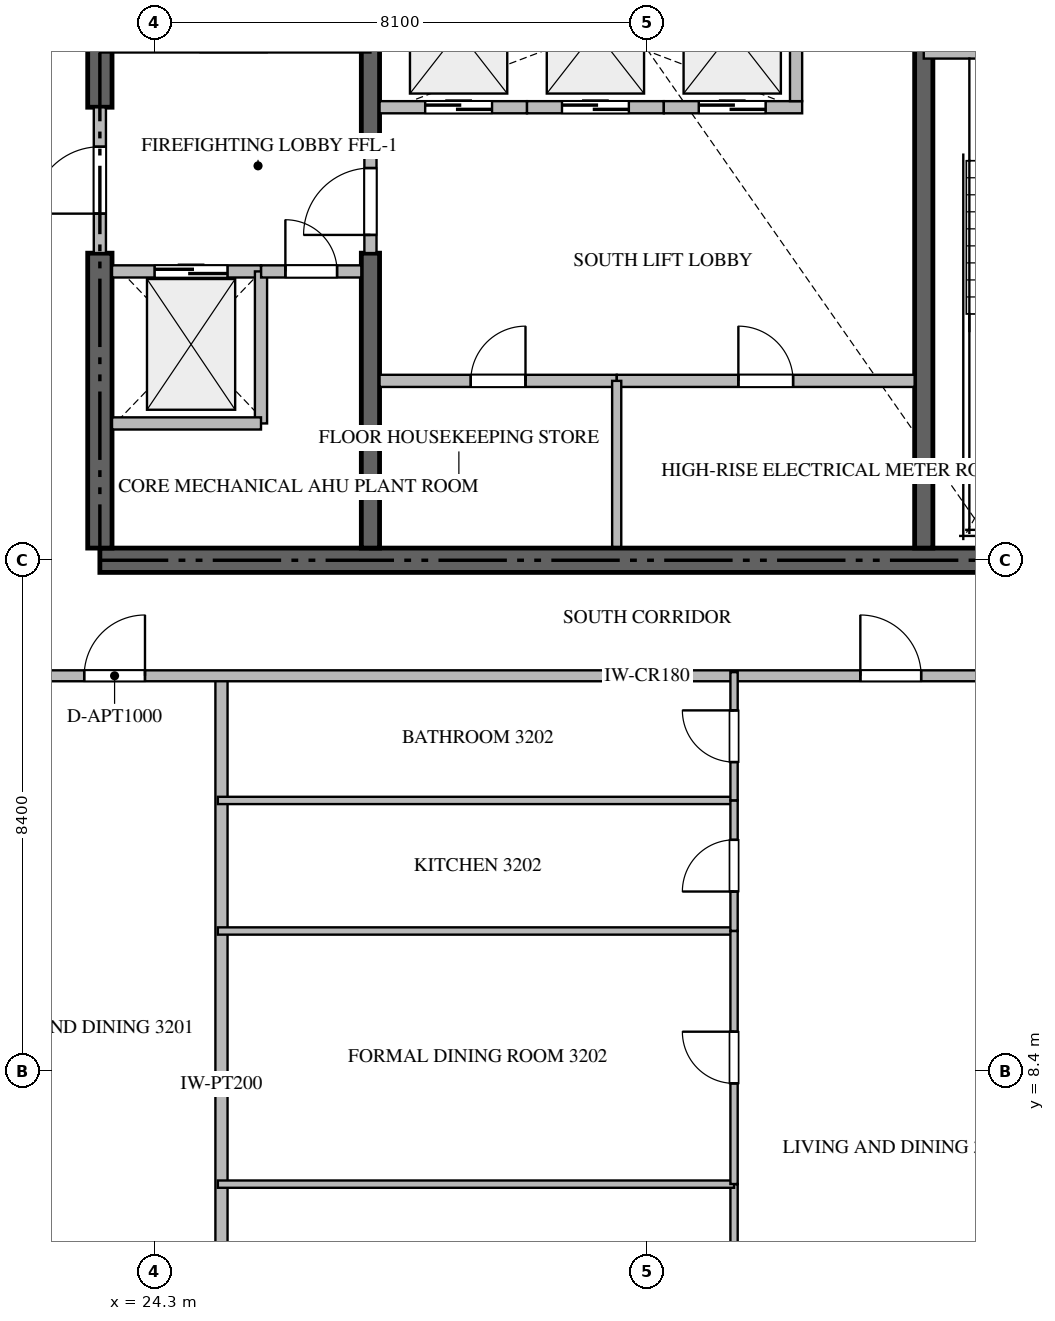
"""IFC4 building model, lengths in metres.
Left out: names, types, materials, properties, quantities, classifications, styles, units other than length and angle.
Written with IfcOpenShell. Run it as: python <this file> out.ifc"""

import sys

from ifc_helpers import new_model, si_unit, direction, frame, frame_2d, origin, place, context, subcontext, project, spatial, rectangle, extrude, source, transform, mapped, element, fill, save


model = new_model("IFC4")
c1 = context("Model", 3, precision=1e-05, world=origin(), true_north=direction((0.0, 1.0)))
c2 = subcontext(c1, "Body", "Model", "MODEL_VIEW")
j1 = project(units=[si_unit("LENGTHUNIT", "METRE"), si_unit("PLANEANGLEUNIT", "RADIAN")], contexts=[c1])
p1 = place(None, origin())
s1 = spatial("IfcSite", under=j1, at=p1, CompositionType="ELEMENT")
p2 = place(p1, origin())
s2 = spatial("IfcBuilding", under=s1, at=p2, CompositionType="ELEMENT")
p3 = place(p2, frame((0.0, 0.0, 131.4)))
s3 = spatial("IfcBuildingStorey", under=s2, at=p3, CompositionType="ELEMENT", Elevation=131.4)
p4 = place(p3, frame((23.4, 16.8, -0.26), z_axis=(0.0, 0.0, 1.0), x_axis=(1.0, 0.0, 0.0)))
e1 = element("IfcWall", 1, at=p4, inside=s3, PredefinedType="SHEAR", context=c2, shape_type="SweptSolid", body=[
    extrude(rectangle(XDim=18.0, YDim=0.4, at=frame_2d((9.0, 0.0))), origin(), (0.0, 0.0, 1.0), 3.748),
])
p5 = place(p3, frame((23.4, 17.0, -0.26), z_axis=(0.0, 0.0, 1.0), x_axis=(0.0, 1.0, 0.0)))
e2 = element("IfcWall", 2, at=p5, inside=s3, PredefinedType="SHEAR", context=c2, shape_type="SweptSolid", body=[
    extrude(rectangle(XDim=4.85, YDim=0.4, at=frame_2d((2.425, 0.0))), origin(), (0.0, 0.0, 1.0), 3.748),
])
p6 = place(p3, frame((23.4, 24.25, -0.26), z_axis=(0.0, 0.0, 1.0), x_axis=(0.0, 1.0, 0.0)))
e3 = element("IfcWall", 3, at=p6, inside=s3, PredefinedType="SHEAR", context=c2, shape_type="SweptSolid", body=[
    extrude(rectangle(XDim=9.15, YDim=0.4, at=frame_2d((4.575, 0.0))), origin(), (0.0, 0.0, 1.0), 3.748),
])
p7 = place(p3, frame((27.85, 17.0, -0.26), z_axis=(0.0, 0.0, 1.0), x_axis=(0.0, 1.0, 0.0)))
e4 = element("IfcWall", 4, at=p7, inside=s3, PredefinedType="SHEAR", context=c2, shape_type="SweptSolid", body=[
    extrude(rectangle(XDim=4.85, YDim=0.3, at=frame_2d((2.425, 0.0))), origin(), (0.0, 0.0, 1.0), 3.748),
])
p8 = place(p3, frame((27.85, 23.55, -0.26), z_axis=(0.0, 0.0, 1.0), x_axis=(0.0, 1.0, 0.0)))
e5 = element("IfcWall", 5, at=p8, inside=s3, PredefinedType="SHEAR", context=c2, shape_type="SweptSolid", body=[
    extrude(rectangle(XDim=9.85, YDim=0.3, at=frame_2d((4.925, 0.0))), origin(), (0.0, 0.0, 1.0), 3.748),
])
p9 = place(p3, frame((36.95, 17.0, -0.26), z_axis=(0.0, 0.0, 1.0), x_axis=(0.0, 1.0, 0.0)))
e6 = element("IfcWall", 6, at=p9, inside=s3, PredefinedType="SHEAR", context=c2, shape_type="SweptSolid", body=[
    extrude(rectangle(XDim=8.35, YDim=0.3, at=frame_2d((4.175, 0.0))), origin(), (0.0, 0.0, 1.0), 3.748),
])
p10 = place(p3, frame((36.95, 25.15, 0.0), z_axis=(0.0, 0.0, 1.0), x_axis=(1.0, 0.0, 0.0)))
e7 = element("IfcWall", 7, at=p10, inside=s3, PredefinedType="STANDARD", context=c2, shape_type="SweptSolid", body=[
    extrude(rectangle(XDim=4.45, YDim=0.2, at=frame_2d((2.225, 0.0))), origin(), (0.0, 0.0, 1.0), 3.49),
])
p11 = place(p10, frame((1.65, 0.0, 0.0)))
e8 = element("IfcOpeningElement", 8, at=p11, cuts=e7, PredefinedType="OPENING", context=c2, shape_type="SweptSolid", body=[
    extrude(rectangle(XDim=1.1, YDim=2.15, at=frame_2d((0.55, 1.075))), frame((0.0, 0.11, 0.0), z_axis=(0.0, -1.0, 0.0), x_axis=(1.0, 0.0, 0.0)), (0.0, 0.0, 1.0), 0.22),
])
p12 = place(p3, frame((23.6, 21.55, 0.0), z_axis=(0.0, 0.0, 1.0), x_axis=(1.0, 0.0, 0.0)))
e9 = element("IfcWall", 9, at=p12, inside=s3, PredefinedType="STANDARD", context=c2, shape_type="SweptSolid", body=[
    extrude(rectangle(XDim=2.45, YDim=0.2, at=frame_2d((1.225, 0.0))), origin(), (0.0, 0.0, 1.0), 3.49),
])
p13 = place(p12, frame((0.7, 0.0, 0.0)))
e10 = element("IfcOpeningElement", 10, at=p13, cuts=e9, PredefinedType="OPENING", context=c2, shape_type="SweptSolid", body=[
    extrude(rectangle(XDim=1.2, YDim=2.2, at=frame_2d((0.6, 1.1))), frame((0.0, 0.11, 0.0), z_axis=(0.0, -1.0, 0.0), x_axis=(1.0, 0.0, 0.0)), (0.0, 0.0, 1.0), 0.22),
])
p14 = place(p3, frame((28.0, 24.25, 0.0), z_axis=(0.0, 0.0, 1.0), x_axis=(1.0, 0.0, 0.0)))
e11 = element("IfcWall", 11, at=p14, inside=s3, PredefinedType="STANDARD", context=c2, shape_type="SweptSolid", body=[
    extrude(rectangle(XDim=2.425, YDim=0.2, at=frame_2d((1.212, 0.0))), origin(), (0.0, 0.0, 1.0), 3.49),
])
p15 = place(p14, frame((0.75, 0.0, 0.0)))
e12 = element("IfcOpeningElement", 12, at=p15, cuts=e11, PredefinedType="OPENING", context=c2, shape_type="SweptSolid", body=[
    extrude(rectangle(XDim=1.1, YDim=2.2, at=frame_2d((0.55, 1.1))), frame((0.0, 0.11, 0.0), z_axis=(0.0, -1.0, 0.0), x_axis=(1.0, 0.0, 0.0)), (0.0, 0.0, 1.0), 0.22),
])
p16 = place(p3, frame((30.425, 24.25, 0.0), z_axis=(0.0, 0.0, 1.0), x_axis=(1.0, 0.0, 0.0)))
e13 = element("IfcWall", 13, at=p16, inside=s3, PredefinedType="STANDARD", context=c2, shape_type="SweptSolid", body=[
    extrude(rectangle(XDim=2.25, YDim=0.2, at=frame_2d((1.125, 0.0))), origin(), (0.0, 0.0, 1.0), 3.49),
])
p17 = place(p16, frame((0.575, 0.0, 0.0)))
e14 = element("IfcOpeningElement", 14, at=p17, cuts=e13, PredefinedType="OPENING", context=c2, shape_type="SweptSolid", body=[
    extrude(rectangle(XDim=1.1, YDim=2.2, at=frame_2d((0.55, 1.1))), frame((0.0, 0.11, 0.0), z_axis=(0.0, -1.0, 0.0), x_axis=(1.0, 0.0, 0.0)), (0.0, 0.0, 1.0), 0.22),
])
p18 = place(p3, frame((32.675, 24.25, 0.0), z_axis=(0.0, 0.0, 1.0), x_axis=(1.0, 0.0, 0.0)))
e15 = element("IfcWall", 15, at=p18, inside=s3, PredefinedType="STANDARD", context=c2, shape_type="SweptSolid", body=[
    extrude(rectangle(XDim=2.275, YDim=0.2, at=frame_2d((1.137, 0.0))), origin(), (0.0, 0.0, 1.0), 3.49),
])
p19 = place(p18, frame((0.575, 0.0, 0.0)))
e16 = element("IfcOpeningElement", 16, at=p19, cuts=e15, PredefinedType="OPENING", context=c2, shape_type="SweptSolid", body=[
    extrude(rectangle(XDim=1.1, YDim=2.2, at=frame_2d((0.55, 1.1))), frame((0.0, 0.11, 0.0), z_axis=(0.0, -1.0, 0.0), x_axis=(1.0, 0.0, 0.0)), (0.0, 0.0, 1.0), 0.22),
])
for number, where, z_axis, x_axis in (
    (17, (34.85, 24.35, 0.0), (0.0, 0.0, 1.0), (0.0, 1.0, 0.0)),
    (18, (26.05, 19.05, 0.0), (0.0, 0.0, 1.0), (0.0, 1.0, 0.0)),
):
    element("IfcWall", number, at=place(p3, frame(where, z_axis=z_axis, x_axis=x_axis)), inside=s3, PredefinedType="STANDARD", context=c2, shape_type="SweptSolid", body=[
        extrude(rectangle(XDim=2.5, YDim=0.2, at=frame_2d((1.25, 0.0))), origin(), (0.0, 0.0, 1.0), 3.49),
    ])
p20 = place(p3, frame((23.6, 19.05, 0.0), z_axis=(0.0, 0.0, 1.0), x_axis=(1.0, 0.0, 0.0)))
e19 = element("IfcWall", 19, at=p20, inside=s3, PredefinedType="STANDARD", context=c2, shape_type="SweptSolid", body=[
    extrude(rectangle(XDim=2.45, YDim=0.2, at=frame_2d((1.225, 0.0))), origin(), (0.0, 0.0, 1.0), 3.49),
])
p21 = place(p3, frame((26.052, 21.55, 0.0), z_axis=(0.0, 0.0, 1.0), x_axis=(1.0, 0.0, 0.0)))
e20 = element("IfcWall", 20, at=p21, inside=s3, PredefinedType="STANDARD", context=c2, shape_type="SweptSolid", body=[
    extrude(rectangle(XDim=1.648, YDim=0.2, at=frame_2d((0.824, 0.0))), origin(), (0.0, 0.0, 1.0), 3.49),
])
p22 = place(p21, frame((0.399, 0.0, 0.0)))
e21 = element("IfcOpeningElement", 21, at=p22, cuts=e20, PredefinedType="OPENING", context=c2, shape_type="SweptSolid", body=[
    extrude(rectangle(XDim=0.85, YDim=2.1, at=frame_2d((0.425, 1.05))), frame((0.0, 0.11, 0.0), z_axis=(0.0, -1.0, 0.0), x_axis=(1.0, 0.0, 0.0)), (0.0, 0.0, 1.0), 0.22),
])
p23 = place(p3, frame((23.4, 21.852, 0.0), z_axis=(0.0, 0.0, 1.0), x_axis=(0.0, 1.0, 0.0)))
e22 = element("IfcWall", 22, at=p23, inside=s3, PredefinedType="STANDARD", context=c2, shape_type="SweptSolid", body=[
    extrude(rectangle(XDim=2.396, YDim=0.2, at=frame_2d((1.198, 0.0))), origin(), (0.0, 0.0, 1.0), 3.49),
])
p24 = place(p23, frame((0.648, 0.0, 0.0)))
e23 = element("IfcOpeningElement", 23, at=p24, cuts=e22, PredefinedType="OPENING", context=c2, shape_type="SweptSolid", body=[
    extrude(rectangle(XDim=1.1, YDim=2.15, at=frame_2d((0.55, 1.075))), frame((0.0, 0.11, 0.0), z_axis=(0.0, -1.0, 0.0), x_axis=(1.0, 0.0, 0.0)), (0.0, 0.0, 1.0), 0.22),
])
p25 = place(p3, frame((27.85, 21.852, 0.0), z_axis=(0.0, 0.0, 1.0), x_axis=(0.0, 1.0, 0.0)))
e24 = element("IfcWall", 24, at=p25, inside=s3, PredefinedType="STANDARD", context=c2, shape_type="SweptSolid", body=[
    extrude(rectangle(XDim=1.696, YDim=0.2, at=frame_2d((0.848, 0.0))), origin(), (0.0, 0.0, 1.0), 3.49),
])
p26 = place(p25, frame((0.298, 0.0, 0.0)))
e25 = element("IfcOpeningElement", 25, at=p26, cuts=e24, PredefinedType="OPENING", context=c2, shape_type="SweptSolid", body=[
    extrude(rectangle(XDim=1.1, YDim=2.15, at=frame_2d((0.55, 1.075))), frame((0.0, 0.11, 0.0), z_axis=(0.0, -1.0, 0.0), x_axis=(1.0, 0.0, 0.0)), (0.0, 0.0, 1.0), 0.22),
])
p27 = place(p3, frame((28.0, 19.75, 0.0), z_axis=(0.0, 0.0, 1.0), x_axis=(1.0, 0.0, 0.0)))
e26 = element("IfcWall", 26, at=p27, inside=s3, PredefinedType="STANDARD", context=c2, shape_type="SweptSolid", body=[
    extrude(rectangle(XDim=3.9, YDim=0.2, at=frame_2d((1.95, 0.0))), origin(), (0.0, 0.0, 1.0), 3.49),
])
p28 = place(p27, frame((1.5, 0.0, 0.0)))
e27 = element("IfcOpeningElement", 27, at=p28, cuts=e26, PredefinedType="OPENING", context=c2, shape_type="SweptSolid", body=[
    extrude(rectangle(XDim=0.9, YDim=2.1, at=frame_2d((0.45, 1.05))), frame((0.0, 0.11, 0.0), z_axis=(0.0, -1.0, 0.0), x_axis=(1.0, 0.0, 0.0)), (0.0, 0.0, 1.0), 0.22),
])
p29 = place(p3, frame((31.902, 19.75, 0.0), z_axis=(0.0, 0.0, 1.0), x_axis=(1.0, 0.0, 0.0)))
e28 = element("IfcWall", 28, at=p29, inside=s3, PredefinedType="STANDARD", context=c2, shape_type="SweptSolid", body=[
    extrude(rectangle(XDim=4.898, YDim=0.2, at=frame_2d((2.449, 0.0))), origin(), (0.0, 0.0, 1.0), 3.49),
])
p30 = place(p29, frame((1.999, 0.0, 0.0)))
e29 = element("IfcOpeningElement", 29, at=p30, cuts=e28, PredefinedType="OPENING", context=c2, shape_type="SweptSolid", body=[
    extrude(rectangle(XDim=0.9, YDim=2.1, at=frame_2d((0.45, 1.05))), frame((0.0, 0.11, 0.0), z_axis=(0.0, -1.0, 0.0), x_axis=(1.0, 0.0, 0.0)), (0.0, 0.0, 1.0), 0.22),
])
p31 = place(p3, frame((31.9, 17.02, 0.0), z_axis=(0.0, 0.0, 1.0), x_axis=(0.0, 1.0, 0.0)))
e30 = element("IfcWall", 30, at=p31, inside=s3, PredefinedType="PARTITIONING", context=c2, shape_type="SweptSolid", body=[
    extrude(rectangle(XDim=2.73, YDim=0.15, at=frame_2d((1.365, 0.0))), origin(), (0.0, 0.0, 1.0), 3.49),
])
p32 = place(p3, frame((25.4, 1.482, 0.0), z_axis=(0.0, 0.0, 1.0), x_axis=(0.0, 1.0, 0.0)))
e31 = element("IfcWall", 31, at=p32, inside=s3, PredefinedType="PARTITIONING", context=c2, shape_type="SweptSolid", body=[
    extrude(rectangle(XDim=13.418, YDim=0.2, at=frame_2d((6.709, 0.0))), origin(), (0.0, 0.0, 1.0), 3.49),
])
p33 = place(p3, frame((20.952, 14.9, 0.0), z_axis=(0.0, 0.0, 1.0), x_axis=(1.0, 0.0, 0.0)))
e32 = element("IfcWall", 32, at=p33, inside=s3, PredefinedType="PARTITIONING", context=c2, shape_type="SweptSolid", body=[
    extrude(rectangle(XDim=22.896, YDim=0.18, at=frame_2d((11.448, 0.0))), origin(), (0.0, 0.0, 1.0), 3.49),
])
p34 = place(p33, frame((2.19, 0.0, 0.0)))
e33 = element("IfcOpeningElement", 33, at=p34, cuts=e32, PredefinedType="OPENING", context=c2, shape_type="SweptSolid", body=[
    extrude(rectangle(XDim=1.0, YDim=2.15, at=frame_2d((0.5, 1.075))), frame((0.0, 0.1, 0.0), z_axis=(0.0, -1.0, 0.0), x_axis=(1.0, 0.0, 0.0)), (0.0, 0.0, 1.0), 0.2),
])
p35 = place(p33, frame((14.955, 0.0, 0.0)))
e34 = element("IfcOpeningElement", 34, at=p35, cuts=e32, PredefinedType="OPENING", context=c2, shape_type="SweptSolid", body=[
    extrude(rectangle(XDim=1.0, YDim=2.15, at=frame_2d((0.5, 1.075))), frame((0.0, 0.1, 0.0), z_axis=(0.0, -1.0, 0.0), x_axis=(1.0, 0.0, 0.0)), (0.0, 0.0, 1.0), 0.2),
])
p36 = place(p33, frame((19.509, 0.0, 0.0)))
e35 = element("IfcOpeningElement", 35, at=p36, cuts=e32, PredefinedType="OPENING", context=c2, shape_type="SweptSolid", body=[
    extrude(rectangle(XDim=1.0, YDim=2.15, at=frame_2d((0.5, 1.075))), frame((0.0, 0.1, 0.0), z_axis=(0.0, -1.0, 0.0), x_axis=(1.0, 0.0, 0.0)), (0.0, 0.0, 1.0), 0.2),
])
p37 = place(p3, frame((33.83, 1.495, 0.0), z_axis=(0.0, 0.0, 1.0), x_axis=(0.0, 1.0, 0.0)))
e36 = element("IfcWall", 36, at=p37, inside=s3, PredefinedType="PARTITIONING", context=c2, shape_type="SweptSolid", body=[
    extrude(rectangle(XDim=5.045, YDim=0.12, at=frame_2d((2.522, 0.0))), origin(), (0.0, 0.0, 1.0), 3.49),
])
p38 = place(p37, frame((2.28, 0.0, 0.0)))
e37 = element("IfcOpeningElement", 37, at=p38, cuts=e36, PredefinedType="OPENING", context=c2, shape_type="SweptSolid", body=[
    extrude(rectangle(XDim=0.9, YDim=2.1, at=frame_2d((0.45, 1.05))), frame((0.0, 0.07, 0.0), z_axis=(0.0, -1.0, 0.0), x_axis=(1.0, 0.0, 0.0)), (0.0, 0.0, 1.0), 0.14),
])
for number, where, z_axis, x_axis in (
    (38, (25.34, 6.54, 0.0), (0.0, 0.0, 1.0), (1.0, 0.0, 0.0)),
    (39, (25.34, 10.703, 0.0), (0.0, 0.0, 1.0), (1.0, 0.0, 0.0)),
    (40, (25.34, 12.85, 0.0), (0.0, 0.0, 1.0), (1.0, 0.0, 0.0)),
):
    element("IfcWall", number, at=place(p3, frame(where, z_axis=z_axis, x_axis=x_axis)), inside=s3, PredefinedType="PARTITIONING", context=c2, shape_type="SweptSolid", body=[
        extrude(rectangle(XDim=8.49, YDim=0.12, at=frame_2d((4.245, 0.0))), origin(), (0.0, 0.0, 1.0), 3.49),
    ])
p39 = place(p3, frame((33.83, 6.542, 0.0), z_axis=(0.0, 0.0, 1.0), x_axis=(0.0, 1.0, 0.0)))
e41 = element("IfcWall", 41, at=p39, inside=s3, PredefinedType="PARTITIONING", context=c2, shape_type="SweptSolid", body=[
    extrude(rectangle(XDim=4.161, YDim=0.12, at=frame_2d((2.081, 0.0))), origin(), (0.0, 0.0, 1.0), 3.49),
])
p40 = place(p39, frame((1.655, 0.0, 0.0)))
e42 = element("IfcOpeningElement", 42, at=p40, cuts=e41, PredefinedType="OPENING", context=c2, shape_type="SweptSolid", body=[
    extrude(rectangle(XDim=0.85, YDim=2.1, at=frame_2d((0.425, 1.05))), frame((0.0, 0.07, 0.0), z_axis=(0.0, -1.0, 0.0), x_axis=(1.0, 0.0, 0.0)), (0.0, 0.0, 1.0), 0.14),
])
p41 = place(p3, frame((33.83, 10.705, 0.0), z_axis=(0.0, 0.0, 1.0), x_axis=(0.0, 1.0, 0.0)))
e43 = element("IfcWall", 43, at=p41, inside=s3, PredefinedType="PARTITIONING", context=c2, shape_type="SweptSolid", body=[
    extrude(rectangle(XDim=2.145, YDim=0.12, at=frame_2d((1.073, 0.0))), origin(), (0.0, 0.0, 1.0), 3.49),
])
p42 = place(p41, frame((0.647, 0.0, 0.0)))
e44 = element("IfcOpeningElement", 44, at=p42, cuts=e43, PredefinedType="OPENING", context=c2, shape_type="SweptSolid", body=[
    extrude(rectangle(XDim=0.85, YDim=2.1, at=frame_2d((0.425, 1.05))), frame((0.0, 0.07, 0.0), z_axis=(0.0, -1.0, 0.0), x_axis=(1.0, 0.0, 0.0)), (0.0, 0.0, 1.0), 0.14),
])
p43 = place(p3, frame((33.83, 12.852, 0.0), z_axis=(0.0, 0.0, 1.0), x_axis=(0.0, 1.0, 0.0)))
e45 = element("IfcWall", 45, at=p43, inside=s3, PredefinedType="PARTITIONING", context=c2, shape_type="SweptSolid", body=[
    extrude(rectangle(XDim=2.108, YDim=0.12, at=frame_2d((1.054, 0.0))), origin(), (0.0, 0.0, 1.0), 3.49),
])
p44 = place(p43, frame((0.629, 0.0, 0.0)))
e46 = element("IfcOpeningElement", 46, at=p44, cuts=e45, PredefinedType="OPENING", context=c2, shape_type="SweptSolid", body=[
    extrude(rectangle(XDim=0.85, YDim=2.1, at=frame_2d((0.425, 1.05))), frame((0.0, 0.07, 0.0), z_axis=(0.0, -1.0, 0.0), x_axis=(1.0, 0.0, 0.0)), (0.0, 0.0, 1.0), 0.14),
])
m1 = source(origin(), c2, "Body", "SweptSolid", [
    extrude(rectangle(XDim=1.2, YDim=2.2, at=frame_2d((0.6, 1.1))), frame((0.0, 0.025, 0.0), z_axis=(0.0, -1.0, 0.0), x_axis=(1.0, 0.0, 0.0)), (0.0, 0.0, 1.0), 0.05),
])
p45 = place(p13, origin())
e47 = element("IfcDoor", 47, at=p45, inside=s3, OperationType="DOUBLE_DOOR_SLIDING", PredefinedType="DOOR", context=c2, shape_type="MappedRepresentation", body=[
    mapped(m1, transform((0.0, 0.0, 0.0), scale=1.0)),
])
fill(e10, e47)
m2 = source(origin(), c2, "Body", "SweptSolid", [
    extrude(rectangle(XDim=1.1, YDim=2.2, at=frame_2d((0.55, 1.1))), frame((0.0, 0.025, 0.0), z_axis=(0.0, -1.0, 0.0), x_axis=(1.0, 0.0, 0.0)), (0.0, 0.0, 1.0), 0.05),
])
p46 = place(p15, origin())
e48 = element("IfcDoor", 48, at=p46, inside=s3, OperationType="DOUBLE_DOOR_SLIDING", PredefinedType="DOOR", context=c2, shape_type="MappedRepresentation", body=[
    mapped(m2, transform((0.0, 0.0, 0.0), scale=1.0)),
])
fill(e12, e48)
p47 = place(p17, origin())
e49 = element("IfcDoor", 49, at=p47, inside=s3, OperationType="DOUBLE_DOOR_SLIDING", PredefinedType="DOOR", context=c2, shape_type="MappedRepresentation", body=[
    mapped(m2, transform((0.0, 0.0, 0.0), scale=1.0)),
])
fill(e14, e49)
p48 = place(p19, origin())
e50 = element("IfcDoor", 50, at=p48, inside=s3, OperationType="DOUBLE_DOOR_SLIDING", PredefinedType="DOOR", context=c2, shape_type="MappedRepresentation", body=[
    mapped(m2, transform((0.0, 0.0, 0.0), scale=1.0)),
])
fill(e16, e50)
m3 = source(origin(), c2, "Body", "SweptSolid", [
    extrude(rectangle(XDim=0.85, YDim=2.1, at=frame_2d((0.425, 1.05))), frame((0.0, 0.025, 0.0), z_axis=(0.0, -1.0, 0.0), x_axis=(1.0, 0.0, 0.0)), (0.0, 0.0, 1.0), 0.05),
])
p49 = place(p22, origin())
e51 = element("IfcDoor", 51, at=p49, inside=s3, OperationType="SINGLE_SWING_LEFT", PredefinedType="DOOR", context=c2, shape_type="MappedRepresentation", body=[
    mapped(m3, transform((0.0, 0.0, 0.0), scale=1.0)),
])
fill(e21, e51)
m4 = source(origin(), c2, "Body", "SweptSolid", [
    extrude(rectangle(XDim=1.1, YDim=2.15, at=frame_2d((0.55, 1.075))), frame((0.0, 0.025, 0.0), z_axis=(0.0, -1.0, 0.0), x_axis=(1.0, 0.0, 0.0)), (0.0, 0.0, 1.0), 0.05),
])
p50 = place(p24, origin())
e52 = element("IfcDoor", 52, at=p50, inside=s3, OperationType="SINGLE_SWING_LEFT", PredefinedType="DOOR", context=c2, shape_type="MappedRepresentation", body=[
    mapped(m4, transform((0.0, 0.0, 0.0), scale=1.0)),
])
fill(e23, e52)
p51 = place(p26, origin())
e53 = element("IfcDoor", 53, at=p51, inside=s3, OperationType="SINGLE_SWING_LEFT", PredefinedType="DOOR", context=c2, shape_type="MappedRepresentation", body=[
    mapped(m4, transform((0.0, 0.0, 0.0), scale=1.0)),
])
fill(e25, e53)
m5 = source(origin(), c2, "Body", "SweptSolid", [
    extrude(rectangle(XDim=0.9, YDim=2.1, at=frame_2d((0.45, 1.05))), frame((0.0, 0.025, 0.0), z_axis=(0.0, -1.0, 0.0), x_axis=(1.0, 0.0, 0.0)), (0.0, 0.0, 1.0), 0.05),
])
p52 = place(p28, origin())
e54 = element("IfcDoor", 54, at=p52, inside=s3, OperationType="SINGLE_SWING_RIGHT", PredefinedType="DOOR", context=c2, shape_type="MappedRepresentation", body=[
    mapped(m5, transform((0.0, 0.0, 0.0), scale=1.0)),
])
fill(e27, e54)
p53 = place(p30, origin())
e55 = element("IfcDoor", 55, at=p53, inside=s3, OperationType="SINGLE_SWING_LEFT", PredefinedType="DOOR", context=c2, shape_type="MappedRepresentation", body=[
    mapped(m5, transform((0.0, 0.0, 0.0), scale=1.0)),
])
fill(e29, e55)
m6 = source(origin(), c2, "Body", "SweptSolid", [
    extrude(rectangle(XDim=1.0, YDim=2.15, at=frame_2d((0.5, 1.075))), frame((0.0, 0.025, 0.0), z_axis=(0.0, -1.0, 0.0), x_axis=(1.0, 0.0, 0.0)), (0.0, 0.0, 1.0), 0.05),
])
p54 = place(p34, origin())
e56 = element("IfcDoor", 56, at=p54, inside=s3, OperationType="SINGLE_SWING_RIGHT", PredefinedType="DOOR", context=c2, shape_type="MappedRepresentation", body=[
    mapped(m6, transform((0.0, 0.0, 0.0), scale=1.0)),
])
fill(e33, e56)
p55 = place(p35, origin())
e57 = element("IfcDoor", 57, at=p55, inside=s3, OperationType="SINGLE_SWING_LEFT", PredefinedType="DOOR", context=c2, shape_type="MappedRepresentation", body=[
    mapped(m6, transform((0.0, 0.0, 0.0), scale=1.0)),
])
fill(e34, e57)
p56 = place(p40, origin())
e58 = element("IfcDoor", 58, at=p56, inside=s3, OperationType="SINGLE_SWING_RIGHT", PredefinedType="DOOR", context=c2, shape_type="MappedRepresentation", body=[
    mapped(m3, transform((0.0, 0.0, 0.0), scale=1.0)),
])
fill(e42, e58)
p57 = place(p42, origin())
e59 = element("IfcDoor", 59, at=p57, inside=s3, OperationType="SINGLE_SWING_LEFT", PredefinedType="DOOR", context=c2, shape_type="MappedRepresentation", body=[
    mapped(m3, transform((0.0, 0.0, 0.0), scale=1.0)),
])
fill(e44, e59)
p58 = place(p44, origin())
e60 = element("IfcDoor", 60, at=p58, inside=s3, OperationType="SINGLE_SWING_RIGHT", PredefinedType="DOOR", context=c2, shape_type="MappedRepresentation", body=[
    mapped(m3, transform((0.0, 0.0, 0.0), scale=1.0)),
])
fill(e46, e60)
save(model, sys.argv[1])
